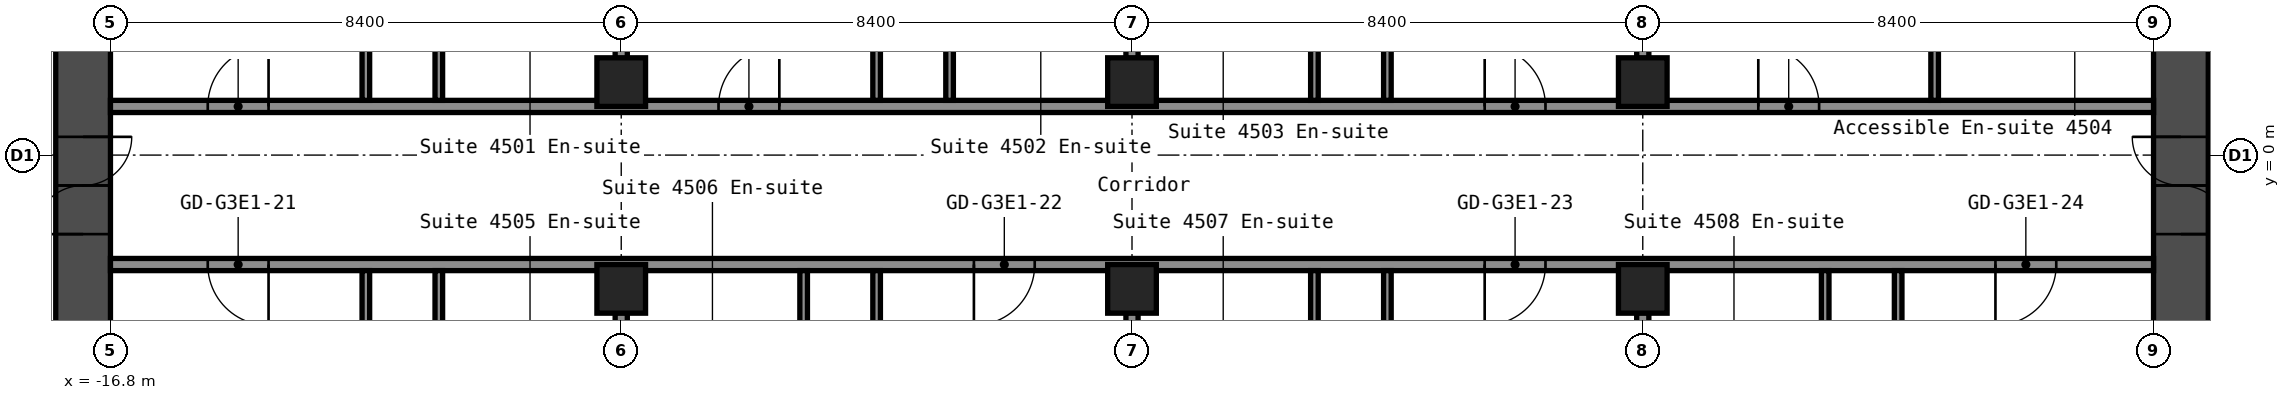
"""IFC4 building model, lengths in metres.
Left out: names, types, materials, properties, quantities, classifications, styles, units other than length and angle.
Written with IfcOpenShell. Run it as: python <this file> out.ifc"""

import sys

from ifc_helpers import new_model, si_unit, direction, frame, frame_2d, origin, origin_2d, place, context, subcontext, project, spatial, rectangle, hollow_rectangle, extrude, element, fill, save


model = new_model("IFC4")
c1 = context("Model", 3, precision=1e-05, world=origin(), true_north=direction((0.0, 1.0)))
c2 = subcontext(c1, "Body", "Model", "MODEL_VIEW")
j1 = project(units=[si_unit("LENGTHUNIT", "METRE"), si_unit("PLANEANGLEUNIT", "RADIAN")], contexts=[c1])
p1 = place(None, origin())
s1 = spatial("IfcSite", under=j1, at=p1, CompositionType="ELEMENT")
p2 = place(p1, origin())
s2 = spatial("IfcBuilding", under=s1, at=p2, CompositionType="ELEMENT")
p3 = place(p2, frame((0.0, 0.0, 159.8)))
s3 = spatial("IfcBuildingStorey", under=s2, at=p3, CompositionType="ELEMENT", Elevation=159.8)
for number, where, z_axis, x_axis in (
    (1, (-8.4, -2.2, 0.0), (0.0, 0.0, 1.0), (1.0, 0.0, 0.0)),
    (2, (-8.4, 1.2, 0.0), (0.0, 0.0, 1.0), (1.0, 0.0, 0.0)),
    (3, (0.0, -2.2, 0.0), (0.0, 0.0, 1.0), (1.0, 0.0, 0.0)),
    (4, (0.0, 1.2, 0.0), (0.0, 0.0, 1.0), (1.0, 0.0, 0.0)),
    (5, (8.4, -2.2, 0.0), (0.0, 0.0, 1.0), (1.0, 0.0, 0.0)),
    (6, (8.4, 1.2, 0.0), (0.0, 0.0, 1.0), (1.0, 0.0, 0.0)),
):
    element("IfcColumn", number, at=place(p3, frame(where, z_axis=z_axis, x_axis=x_axis)), inside=s3, PredefinedType="COLUMN", context=c2, shape_type="SweptSolid", body=[
        extrude(hollow_rectangle(XDim=0.8, YDim=0.8, WallThickness=0.032, at=origin_2d()), origin(), (0.0, 0.0, 1.0), 2.75),
    ])
p4 = place(p3, frame((-17.25, -8.4, 0.0), z_axis=(0.0, 0.0, 1.0), x_axis=(0.0, 1.0, 0.0)))
e7 = element("IfcWall", 7, at=p4, inside=s3, PredefinedType="SHEAR", context=c2, shape_type="SweptSolid", body=[
    extrude(rectangle(XDim=16.8, YDim=0.9, at=frame_2d((8.4, 0.0))), origin(), (0.0, 0.0, 1.0), 2.75),
])
p5 = place(p4, frame((7.1, 0.0, 0.0)))
e8 = element("IfcOpeningElement", 8, at=p5, cuts=e7, PredefinedType="OPENING", context=c2, shape_type="SweptSolid", body=[
    extrude(rectangle(XDim=1.6, YDim=2.1, at=frame_2d((0.8, 1.05))), frame((0.0, 0.46, 0.0), z_axis=(0.0, -1.0, 0.0), x_axis=(1.0, 0.0, 0.0)), (0.0, 0.0, 1.0), 0.92),
])
p6 = place(p3, frame((17.25, -8.4, 0.0), z_axis=(0.0, 0.0, 1.0), x_axis=(0.0, 1.0, 0.0)))
e9 = element("IfcWall", 9, at=p6, inside=s3, PredefinedType="SHEAR", context=c2, shape_type="SweptSolid", body=[
    extrude(rectangle(XDim=16.8, YDim=0.9, at=frame_2d((8.4, 0.0))), origin(), (0.0, 0.0, 1.0), 2.75),
])
p7 = place(p6, frame((7.1, 0.0, 0.0)))
e10 = element("IfcOpeningElement", 10, at=p7, cuts=e9, PredefinedType="OPENING", context=c2, shape_type="SweptSolid", body=[
    extrude(rectangle(XDim=1.6, YDim=2.1, at=frame_2d((0.8, 1.05))), frame((0.0, 0.46, 0.0), z_axis=(0.0, -1.0, 0.0), x_axis=(1.0, 0.0, 0.0)), (0.0, 0.0, 1.0), 0.92),
])
p8 = place(p3, frame((-16.8, -1.8, 0.0), z_axis=(0.0, 0.0, 1.0), x_axis=(1.0, 0.0, 0.0)))
e11 = element("IfcWall", 11, at=p8, inside=s3, PredefinedType="PARTITIONING", context=c2, shape_type="SweptSolid", body=[
    extrude(rectangle(XDim=33.6, YDim=0.2, at=frame_2d((16.8, 0.0))), origin(), (0.0, 0.0, 1.0), 2.75),
])
p9 = place(p8, frame((1.6, 0.0, 0.0)))
e12 = element("IfcOpeningElement", 12, at=p9, cuts=e11, PredefinedType="OPENING", context=c2, shape_type="SweptSolid", body=[
    extrude(rectangle(XDim=1.0, YDim=2.1, at=frame_2d((0.5, 1.05))), frame((0.0, 0.11, 0.0), z_axis=(0.0, -1.0, 0.0), x_axis=(1.0, 0.0, 0.0)), (0.0, 0.0, 1.0), 0.22),
])
p10 = place(p8, frame((14.2, 0.0, 0.0)))
e13 = element("IfcOpeningElement", 13, at=p10, cuts=e11, PredefinedType="OPENING", context=c2, shape_type="SweptSolid", body=[
    extrude(rectangle(XDim=1.0, YDim=2.1, at=frame_2d((0.5, 1.05))), frame((0.0, 0.11, 0.0), z_axis=(0.0, -1.0, 0.0), x_axis=(1.0, 0.0, 0.0)), (0.0, 0.0, 1.0), 0.22),
])
p11 = place(p8, frame((22.6, 0.0, 0.0)))
e14 = element("IfcOpeningElement", 14, at=p11, cuts=e11, PredefinedType="OPENING", context=c2, shape_type="SweptSolid", body=[
    extrude(rectangle(XDim=1.0, YDim=2.1, at=frame_2d((0.5, 1.05))), frame((0.0, 0.11, 0.0), z_axis=(0.0, -1.0, 0.0), x_axis=(1.0, 0.0, 0.0)), (0.0, 0.0, 1.0), 0.22),
])
p12 = place(p8, frame((31.0, 0.0, 0.0)))
e15 = element("IfcOpeningElement", 15, at=p12, cuts=e11, PredefinedType="OPENING", context=c2, shape_type="SweptSolid", body=[
    extrude(rectangle(XDim=1.0, YDim=2.1, at=frame_2d((0.5, 1.05))), frame((0.0, 0.11, 0.0), z_axis=(0.0, -1.0, 0.0), x_axis=(1.0, 0.0, 0.0)), (0.0, 0.0, 1.0), 0.22),
])
p13 = place(p3, frame((-16.8, 0.8, 0.0), z_axis=(0.0, 0.0, 1.0), x_axis=(1.0, 0.0, 0.0)))
e16 = element("IfcWall", 16, at=p13, inside=s3, PredefinedType="PARTITIONING", context=c2, shape_type="SweptSolid", body=[
    extrude(rectangle(XDim=33.6, YDim=0.2, at=frame_2d((16.8, 0.0))), origin(), (0.0, 0.0, 1.0), 2.75),
])
p14 = place(p13, frame((1.6, 0.0, 0.0)))
e17 = element("IfcOpeningElement", 17, at=p14, cuts=e16, PredefinedType="OPENING", context=c2, shape_type="SweptSolid", body=[
    extrude(rectangle(XDim=1.0, YDim=2.1, at=frame_2d((0.5, 1.05))), frame((0.0, 0.11, 0.0), z_axis=(0.0, -1.0, 0.0), x_axis=(1.0, 0.0, 0.0)), (0.0, 0.0, 1.0), 0.22),
])
p15 = place(p13, frame((10.0, 0.0, 0.0)))
e18 = element("IfcOpeningElement", 18, at=p15, cuts=e16, PredefinedType="OPENING", context=c2, shape_type="SweptSolid", body=[
    extrude(rectangle(XDim=1.0, YDim=2.1, at=frame_2d((0.5, 1.05))), frame((0.0, 0.11, 0.0), z_axis=(0.0, -1.0, 0.0), x_axis=(1.0, 0.0, 0.0)), (0.0, 0.0, 1.0), 0.22),
])
p16 = place(p13, frame((22.6, 0.0, 0.0)))
e19 = element("IfcOpeningElement", 19, at=p16, cuts=e16, PredefinedType="OPENING", context=c2, shape_type="SweptSolid", body=[
    extrude(rectangle(XDim=1.0, YDim=2.1, at=frame_2d((0.5, 1.05))), frame((0.0, 0.11, 0.0), z_axis=(0.0, -1.0, 0.0), x_axis=(1.0, 0.0, 0.0)), (0.0, 0.0, 1.0), 0.22),
])
p17 = place(p13, frame((27.1, 0.0, 0.0)))
e20 = element("IfcOpeningElement", 20, at=p17, cuts=e16, PredefinedType="OPENING", context=c2, shape_type="SweptSolid", body=[
    extrude(rectangle(XDim=1.0, YDim=2.1, at=frame_2d((0.5, 1.05))), frame((0.0, 0.11, 0.0), z_axis=(0.0, -1.0, 0.0), x_axis=(1.0, 0.0, 0.0)), (0.0, 0.0, 1.0), 0.22),
])
p18 = place(p3, frame((-12.6, -19.3, 0.0), z_axis=(0.0, 0.0, 1.0), x_axis=(0.0, 1.0, 0.0)))
e21 = element("IfcWall", 21, at=p18, inside=s3, PredefinedType="PARTITIONING", context=c2, shape_type="SweptSolid", body=[
    extrude(rectangle(XDim=17.4, YDim=0.125, at=frame_2d((8.7, 0.0))), origin(), (0.0, 0.0, 1.0), 2.75),
])
p19 = place(p18, frame((12.45, 0.0, 0.0)))
e22 = element("IfcOpeningElement", 22, at=p19, cuts=e21, PredefinedType="OPENING", context=c2, shape_type="SweptSolid", body=[
    extrude(rectangle(XDim=0.9, YDim=2.1, at=frame_2d((0.45, 1.05))), frame((0.0, 0.073, 0.0), z_axis=(0.0, -1.0, 0.0), x_axis=(1.0, 0.0, 0.0)), (0.0, 0.0, 1.0), 0.145),
])
p20 = place(p3, frame((-12.6, 0.9, 0.0), z_axis=(0.0, 0.0, 1.0), x_axis=(0.0, 1.0, 0.0)))
e23 = element("IfcWall", 23, at=p20, inside=s3, PredefinedType="PARTITIONING", context=c2, shape_type="SweptSolid", body=[
    extrude(rectangle(XDim=17.4, YDim=0.125, at=frame_2d((8.7, 0.0))), origin(), (0.0, 0.0, 1.0), 2.75),
])
p21 = place(p20, frame((4.05, 0.0, 0.0)))
e24 = element("IfcOpeningElement", 24, at=p21, cuts=e23, PredefinedType="OPENING", context=c2, shape_type="SweptSolid", body=[
    extrude(rectangle(XDim=0.9, YDim=2.1, at=frame_2d((0.45, 1.05))), frame((0.0, 0.073, 0.0), z_axis=(0.0, -1.0, 0.0), x_axis=(1.0, 0.0, 0.0)), (0.0, 0.0, 1.0), 0.145),
])
for number, where, z_axis, x_axis in (
    (25, (-11.4, -5.0, 0.0), (0.0, 0.0, 1.0), (0.0, 1.0, 0.0)),
    (26, (-11.4, 0.9, 0.0), (0.0, 0.0, 1.0), (0.0, 1.0, 0.0)),
):
    element("IfcWall", number, at=place(p3, frame(where, z_axis=z_axis, x_axis=x_axis)), inside=s3, PredefinedType="PARTITIONING", context=c2, shape_type="SweptSolid", body=[
        extrude(rectangle(XDim=3.1, YDim=0.125, at=frame_2d((1.55, 0.0))), origin(), (0.0, 0.0, 1.0), 2.75),
    ])
for number, where, z_axis, x_axis in (
    (27, (-8.4, -19.3, 0.0), (0.0, 0.0, 1.0), (0.0, 1.0, 0.0)),
    (28, (-8.4, 1.59, 0.0), (0.0, 0.0, 1.0), (0.0, 1.0, 0.0)),
):
    element("IfcWall", number, at=place(p3, frame(where, z_axis=z_axis, x_axis=x_axis)), inside=s3, PredefinedType="PARTITIONING", context=c2, shape_type="SweptSolid", body=[
        extrude(rectangle(XDim=16.71, YDim=0.2, at=frame_2d((8.355, 0.0))), origin(), (0.0, 0.0, 1.0), 2.75),
    ])
p22 = place(p3, frame((-5.4, -5.0, 0.0), z_axis=(0.0, 0.0, 1.0), x_axis=(0.0, 1.0, 0.0)))
e29 = element("IfcWall", 29, at=p22, inside=s3, PredefinedType="PARTITIONING", context=c2, shape_type="SweptSolid", body=[
    extrude(rectangle(XDim=3.1, YDim=0.125, at=frame_2d((1.55, 0.0))), origin(), (0.0, 0.0, 1.0), 2.75),
])
p23 = place(p3, frame((-4.2, -19.3, 0.0), z_axis=(0.0, 0.0, 1.0), x_axis=(0.0, 1.0, 0.0)))
e30 = element("IfcWall", 30, at=p23, inside=s3, PredefinedType="PARTITIONING", context=c2, shape_type="SweptSolid", body=[
    extrude(rectangle(XDim=17.4, YDim=0.125, at=frame_2d((8.7, 0.0))), origin(), (0.0, 0.0, 1.0), 2.75),
])
p24 = place(p23, frame((12.45, 0.0, 0.0)))
e31 = element("IfcOpeningElement", 31, at=p24, cuts=e30, PredefinedType="OPENING", context=c2, shape_type="SweptSolid", body=[
    extrude(rectangle(XDim=0.9, YDim=2.1, at=frame_2d((0.45, 1.05))), frame((0.0, 0.073, 0.0), z_axis=(0.0, -1.0, 0.0), x_axis=(1.0, 0.0, 0.0)), (0.0, 0.0, 1.0), 0.145),
])
p25 = place(p3, frame((-4.2, 0.9, 0.0), z_axis=(0.0, 0.0, 1.0), x_axis=(0.0, 1.0, 0.0)))
e32 = element("IfcWall", 32, at=p25, inside=s3, PredefinedType="PARTITIONING", context=c2, shape_type="SweptSolid", body=[
    extrude(rectangle(XDim=17.4, YDim=0.125, at=frame_2d((8.7, 0.0))), origin(), (0.0, 0.0, 1.0), 2.75),
])
p26 = place(p25, frame((4.05, 0.0, 0.0)))
e33 = element("IfcOpeningElement", 33, at=p26, cuts=e32, PredefinedType="OPENING", context=c2, shape_type="SweptSolid", body=[
    extrude(rectangle(XDim=0.9, YDim=2.1, at=frame_2d((0.45, 1.05))), frame((0.0, 0.073, 0.0), z_axis=(0.0, -1.0, 0.0), x_axis=(1.0, 0.0, 0.0)), (0.0, 0.0, 1.0), 0.145),
])
p27 = place(p3, frame((-3.0, 0.9, 0.0), z_axis=(0.0, 0.0, 1.0), x_axis=(0.0, 1.0, 0.0)))
e34 = element("IfcWall", 34, at=p27, inside=s3, PredefinedType="PARTITIONING", context=c2, shape_type="SweptSolid", body=[
    extrude(rectangle(XDim=3.1, YDim=0.125, at=frame_2d((1.55, 0.0))), origin(), (0.0, 0.0, 1.0), 2.75),
])
for number, where, z_axis, x_axis in (
    (35, (0.0, -19.3, 0.0), (0.0, 0.0, 1.0), (0.0, 1.0, 0.0)),
    (36, (0.0, 1.59, 0.0), (0.0, 0.0, 1.0), (0.0, 1.0, 0.0)),
):
    element("IfcWall", number, at=place(p3, frame(where, z_axis=z_axis, x_axis=x_axis)), inside=s3, PredefinedType="PARTITIONING", context=c2, shape_type="SweptSolid", body=[
        extrude(rectangle(XDim=16.71, YDim=0.2, at=frame_2d((8.355, 0.0))), origin(), (0.0, 0.0, 1.0), 2.75),
    ])
for number, where, z_axis, x_axis in (
    (37, (3.0, -5.0, 0.0), (0.0, 0.0, 1.0), (0.0, 1.0, 0.0)),
    (38, (3.0, 0.9, 0.0), (0.0, 0.0, 1.0), (0.0, 1.0, 0.0)),
):
    element("IfcWall", number, at=place(p3, frame(where, z_axis=z_axis, x_axis=x_axis)), inside=s3, PredefinedType="PARTITIONING", context=c2, shape_type="SweptSolid", body=[
        extrude(rectangle(XDim=3.1, YDim=0.125, at=frame_2d((1.55, 0.0))), origin(), (0.0, 0.0, 1.0), 2.75),
    ])
p28 = place(p3, frame((4.2, -19.3, 0.0), z_axis=(0.0, 0.0, 1.0), x_axis=(0.0, 1.0, 0.0)))
e39 = element("IfcWall", 39, at=p28, inside=s3, PredefinedType="PARTITIONING", context=c2, shape_type="SweptSolid", body=[
    extrude(rectangle(XDim=17.4, YDim=0.125, at=frame_2d((8.7, 0.0))), origin(), (0.0, 0.0, 1.0), 2.75),
])
p29 = place(p28, frame((12.45, 0.0, 0.0)))
e40 = element("IfcOpeningElement", 40, at=p29, cuts=e39, PredefinedType="OPENING", context=c2, shape_type="SweptSolid", body=[
    extrude(rectangle(XDim=0.9, YDim=2.1, at=frame_2d((0.45, 1.05))), frame((0.0, 0.073, 0.0), z_axis=(0.0, -1.0, 0.0), x_axis=(1.0, 0.0, 0.0)), (0.0, 0.0, 1.0), 0.145),
])
p30 = place(p3, frame((4.2, 0.9, 0.0), z_axis=(0.0, 0.0, 1.0), x_axis=(0.0, 1.0, 0.0)))
e41 = element("IfcWall", 41, at=p30, inside=s3, PredefinedType="PARTITIONING", context=c2, shape_type="SweptSolid", body=[
    extrude(rectangle(XDim=17.4, YDim=0.125, at=frame_2d((8.7, 0.0))), origin(), (0.0, 0.0, 1.0), 2.75),
])
p31 = place(p30, frame((4.05, 0.0, 0.0)))
e42 = element("IfcOpeningElement", 42, at=p31, cuts=e41, PredefinedType="OPENING", context=c2, shape_type="SweptSolid", body=[
    extrude(rectangle(XDim=0.9, YDim=2.1, at=frame_2d((0.45, 1.05))), frame((0.0, 0.073, 0.0), z_axis=(0.0, -1.0, 0.0), x_axis=(1.0, 0.0, 0.0)), (0.0, 0.0, 1.0), 0.145),
])
for number, where, z_axis, x_axis in (
    (43, (8.4, -19.3, 0.0), (0.0, 0.0, 1.0), (0.0, 1.0, 0.0)),
    (44, (8.4, 1.59, 0.0), (0.0, 0.0, 1.0), (0.0, 1.0, 0.0)),
):
    element("IfcWall", number, at=place(p3, frame(where, z_axis=z_axis, x_axis=x_axis)), inside=s3, PredefinedType="PARTITIONING", context=c2, shape_type="SweptSolid", body=[
        extrude(rectangle(XDim=16.71, YDim=0.2, at=frame_2d((8.355, 0.0))), origin(), (0.0, 0.0, 1.0), 2.75),
    ])
p32 = place(p3, frame((11.4, -5.0, 0.0), z_axis=(0.0, 0.0, 1.0), x_axis=(0.0, 1.0, 0.0)))
e45 = element("IfcWall", 45, at=p32, inside=s3, PredefinedType="PARTITIONING", context=c2, shape_type="SweptSolid", body=[
    extrude(rectangle(XDim=3.1, YDim=0.125, at=frame_2d((1.55, 0.0))), origin(), (0.0, 0.0, 1.0), 2.75),
])
p33 = place(p3, frame((12.6, -19.3, 0.0), z_axis=(0.0, 0.0, 1.0), x_axis=(0.0, 1.0, 0.0)))
e46 = element("IfcWall", 46, at=p33, inside=s3, PredefinedType="PARTITIONING", context=c2, shape_type="SweptSolid", body=[
    extrude(rectangle(XDim=17.4, YDim=0.125, at=frame_2d((8.7, 0.0))), origin(), (0.0, 0.0, 1.0), 2.75),
])
p34 = place(p33, frame((12.45, 0.0, 0.0)))
e47 = element("IfcOpeningElement", 47, at=p34, cuts=e46, PredefinedType="OPENING", context=c2, shape_type="SweptSolid", body=[
    extrude(rectangle(XDim=0.9, YDim=2.1, at=frame_2d((0.45, 1.05))), frame((0.0, 0.073, 0.0), z_axis=(0.0, -1.0, 0.0), x_axis=(1.0, 0.0, 0.0)), (0.0, 0.0, 1.0), 0.145),
])
p35 = place(p3, frame((13.2, 0.9, 0.0), z_axis=(0.0, 0.0, 1.0), x_axis=(0.0, 1.0, 0.0)))
e48 = element("IfcWall", 48, at=p35, inside=s3, PredefinedType="PARTITIONING", context=c2, shape_type="SweptSolid", body=[
    extrude(rectangle(XDim=3.3, YDim=0.125, at=frame_2d((1.65, 0.0))), origin(), (0.0, 0.0, 1.0), 2.75),
])
p36 = place(p35, frame((1.1, 0.0, 0.0)))
e49 = element("IfcOpeningElement", 49, at=p36, cuts=e48, PredefinedType="OPENING", context=c2, shape_type="SweptSolid", body=[
    extrude(rectangle(XDim=1.0, YDim=2.1, at=frame_2d((0.5, 1.05))), frame((0.0, 0.073, 0.0), z_axis=(0.0, -1.0, 0.0), x_axis=(1.0, 0.0, 0.0)), (0.0, 0.0, 1.0), 0.145),
])
p37 = place(p5, origin())
e50 = element("IfcDoor", 50, at=p37, inside=s3, OperationType="DOUBLE_DOOR_SINGLE_SWING", PredefinedType="DOOR", context=c2, shape_type="SweptSolid", body=[
    extrude(rectangle(XDim=1.6, YDim=2.1, at=frame_2d((0.8, 1.05))), frame((0.0, 0.025, 0.0), z_axis=(0.0, -1.0, 0.0), x_axis=(1.0, 0.0, 0.0)), (0.0, 0.0, 1.0), 0.05),
])
fill(e8, e50)
p38 = place(p7, origin())
e51 = element("IfcDoor", 51, at=p38, inside=s3, OperationType="DOUBLE_DOOR_SINGLE_SWING", PredefinedType="DOOR", context=c2, shape_type="SweptSolid", body=[
    extrude(rectangle(XDim=1.6, YDim=2.1, at=frame_2d((0.8, 1.05))), frame((0.0, 0.025, 0.0), z_axis=(0.0, -1.0, 0.0), x_axis=(1.0, 0.0, 0.0)), (0.0, 0.0, 1.0), 0.05),
])
fill(e10, e51)
p39 = place(p9, origin())
e52 = element("IfcDoor", 52, at=p39, inside=s3, OperationType="SINGLE_SWING_RIGHT", PredefinedType="DOOR", context=c2, shape_type="SweptSolid", body=[
    extrude(rectangle(XDim=1.0, YDim=2.1, at=frame_2d((0.5, 1.05))), frame((0.0, 0.025, 0.0), z_axis=(0.0, -1.0, 0.0), x_axis=(1.0, 0.0, 0.0)), (0.0, 0.0, 1.0), 0.05),
])
fill(e12, e52)
p40 = place(p10, origin())
e53 = element("IfcDoor", 53, at=p40, inside=s3, OperationType="SINGLE_SWING_LEFT", PredefinedType="DOOR", context=c2, shape_type="SweptSolid", body=[
    extrude(rectangle(XDim=1.0, YDim=2.1, at=frame_2d((0.5, 1.05))), frame((0.0, 0.025, 0.0), z_axis=(0.0, -1.0, 0.0), x_axis=(1.0, 0.0, 0.0)), (0.0, 0.0, 1.0), 0.05),
])
fill(e13, e53)
p41 = place(p11, origin())
e54 = element("IfcDoor", 54, at=p41, inside=s3, OperationType="SINGLE_SWING_LEFT", PredefinedType="DOOR", context=c2, shape_type="SweptSolid", body=[
    extrude(rectangle(XDim=1.0, YDim=2.1, at=frame_2d((0.5, 1.05))), frame((0.0, 0.025, 0.0), z_axis=(0.0, -1.0, 0.0), x_axis=(1.0, 0.0, 0.0)), (0.0, 0.0, 1.0), 0.05),
])
fill(e14, e54)
p42 = place(p12, origin())
e55 = element("IfcDoor", 55, at=p42, inside=s3, OperationType="SINGLE_SWING_LEFT", PredefinedType="DOOR", context=c2, shape_type="SweptSolid", body=[
    extrude(rectangle(XDim=1.0, YDim=2.1, at=frame_2d((0.5, 1.05))), frame((0.0, 0.025, 0.0), z_axis=(0.0, -1.0, 0.0), x_axis=(1.0, 0.0, 0.0)), (0.0, 0.0, 1.0), 0.05),
])
fill(e15, e55)
p43 = place(p14, origin())
e56 = element("IfcDoor", 56, at=p43, inside=s3, OperationType="SINGLE_SWING_LEFT", PredefinedType="DOOR", context=c2, shape_type="SweptSolid", body=[
    extrude(rectangle(XDim=1.0, YDim=2.1, at=frame_2d((0.5, 1.05))), frame((0.0, 0.025, 0.0), z_axis=(0.0, -1.0, 0.0), x_axis=(1.0, 0.0, 0.0)), (0.0, 0.0, 1.0), 0.05),
])
fill(e17, e56)
p44 = place(p15, origin())
e57 = element("IfcDoor", 57, at=p44, inside=s3, OperationType="SINGLE_SWING_LEFT", PredefinedType="DOOR", context=c2, shape_type="SweptSolid", body=[
    extrude(rectangle(XDim=1.0, YDim=2.1, at=frame_2d((0.5, 1.05))), frame((0.0, 0.025, 0.0), z_axis=(0.0, -1.0, 0.0), x_axis=(1.0, 0.0, 0.0)), (0.0, 0.0, 1.0), 0.05),
])
fill(e18, e57)
p45 = place(p16, origin())
e58 = element("IfcDoor", 58, at=p45, inside=s3, OperationType="SINGLE_SWING_RIGHT", PredefinedType="DOOR", context=c2, shape_type="SweptSolid", body=[
    extrude(rectangle(XDim=1.0, YDim=2.1, at=frame_2d((0.5, 1.05))), frame((0.0, 0.025, 0.0), z_axis=(0.0, -1.0, 0.0), x_axis=(1.0, 0.0, 0.0)), (0.0, 0.0, 1.0), 0.05),
])
fill(e19, e58)
p46 = place(p17, origin())
e59 = element("IfcDoor", 59, at=p46, inside=s3, OperationType="SINGLE_SWING_RIGHT", PredefinedType="DOOR", context=c2, shape_type="SweptSolid", body=[
    extrude(rectangle(XDim=1.0, YDim=2.1, at=frame_2d((0.5, 1.05))), frame((0.0, 0.025, 0.0), z_axis=(0.0, -1.0, 0.0), x_axis=(1.0, 0.0, 0.0)), (0.0, 0.0, 1.0), 0.05),
])
fill(e20, e59)
save(model, sys.argv[1])
